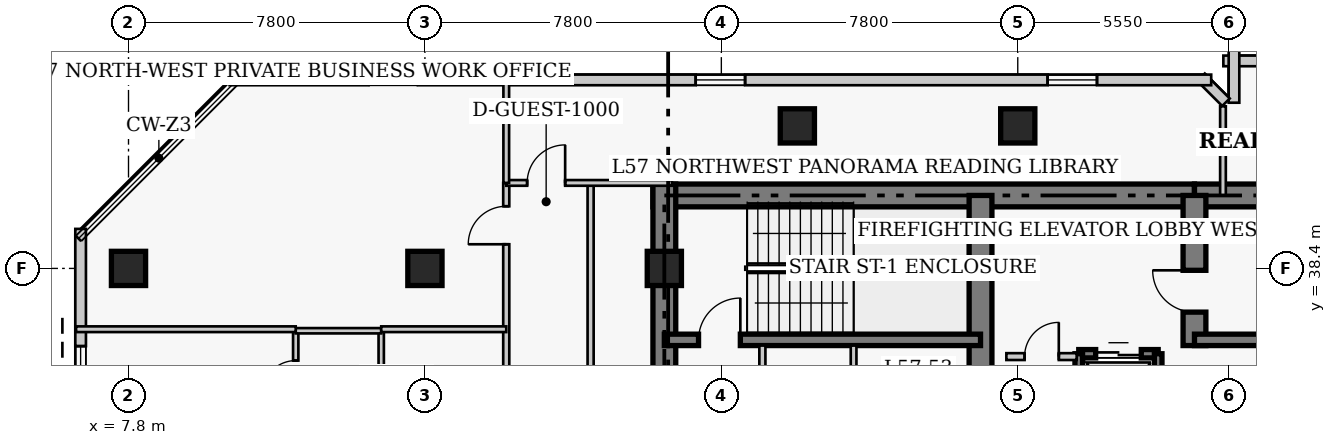
"""IFC4 building model, lengths in metres.
Left out: names, types, materials, properties, quantities, classifications, styles, units other than length and angle.
Written with IfcOpenShell. Run it as: python <this file> out.ifc"""

import sys

from ifc_helpers import new_model, si_unit, direction, frame, frame_2d, origin, origin_2d, place, context, subcontext, project, spatial, rectangle, extrude, element, fill, save


model = new_model("IFC4")
c1 = context("Model", 3, precision=1e-05, world=origin(), true_north=direction((0.0, 1.0)))
c2 = subcontext(c1, "Body", "Model", "MODEL_VIEW")
j1 = project(units=[si_unit("LENGTHUNIT", "METRE"), si_unit("PLANEANGLEUNIT", "RADIAN")], contexts=[c1])
p1 = place(None, origin())
s1 = spatial("IfcSite", under=j1, at=p1, CompositionType="ELEMENT")
p2 = place(p1, origin())
s2 = spatial("IfcBuilding", under=s1, at=p2, CompositionType="ELEMENT")
p3 = place(p2, frame((0.0, 0.0, 228.0)))
s3 = spatial("IfcBuildingStorey", under=s2, at=p3, CompositionType="ELEMENT", Elevation=228.0)
p4 = place(p3, frame((21.6, 40.32, 0.0), z_axis=(0.0, 0.0, 1.0), x_axis=(1.0, 0.0, 0.0)))
e1 = element("IfcWall", 1, at=p4, inside=s3, PredefinedType="SHEAR", context=c2, shape_type="SweptSolid", body=[
    extrude(rectangle(XDim=14.25, YDim=0.6, at=frame_2d((7.125, 0.0))), origin(), (0.0, 0.0, 1.0), 3.9),
])
p5 = place(p3, frame((35.85, 40.32, 0.0), z_axis=(0.0, 0.0, 1.0), x_axis=(1.0, 0.0, 0.0)))
e2 = element("IfcWall", 2, at=p5, inside=s3, PredefinedType="SHEAR", context=c2, shape_type="SweptSolid", body=[
    extrude(rectangle(XDim=12.6, YDim=0.6, at=frame_2d((6.3, 0.0))), origin(), (0.0, 0.0, 1.0), 3.9),
])
p6 = place(p3, frame((21.9, 27.05, 0.0), z_axis=(0.0, 0.0, 1.0), x_axis=(0.0, 1.0, 0.0)))
e3 = element("IfcWall", 3, at=p6, inside=s3, PredefinedType="SHEAR", context=c2, shape_type="SweptSolid", body=[
    extrude(rectangle(XDim=13.57, YDim=0.6, at=frame_2d((6.785, 0.0))), origin(), (0.0, 0.0, 1.0), 3.9),
])
p7 = place(p3, frame((30.22, 33.05, 0.0), z_axis=(0.0, 0.0, 1.0), x_axis=(0.0, 1.0, 0.0)))
e4 = element("IfcWall", 4, at=p7, inside=s3, PredefinedType="SHEAR", context=c2, shape_type="SweptSolid", body=[
    extrude(rectangle(XDim=7.27, YDim=0.6, at=frame_2d((3.635, 0.0))), origin(), (0.0, 0.0, 1.0), 3.9),
])
p8 = place(p3, frame((35.85, 36.37, 0.0), z_axis=(0.0, 0.0, 1.0), x_axis=(0.0, 1.0, 0.0)))
e5 = element("IfcWall", 5, at=p8, inside=s3, PredefinedType="SHEAR", context=c2, shape_type="SweptSolid", body=[
    extrude(rectangle(XDim=3.95, YDim=0.6, at=frame_2d((1.975, 0.0))), origin(), (0.0, 0.0, 1.0), 3.9),
])
p9 = place(p8, frame((0.88, 0.0, 0.0)))
e6 = element("IfcOpeningElement", 6, at=p9, cuts=e5, PredefinedType="OPENING", context=c2, shape_type="SweptSolid", body=[
    extrude(rectangle(XDim=1.1, YDim=2.15, at=frame_2d((0.55, 1.075))), frame((0.0, 0.31, 0.0), z_axis=(0.0, -1.0, 0.0), x_axis=(1.0, 0.0, 0.0)), (0.0, 0.0, 1.0), 0.62),
])
p10 = place(p3, frame((21.9, 36.52, 0.0), z_axis=(0.0, 0.0, 1.0), x_axis=(1.0, 0.0, 0.0)))
e7 = element("IfcWall", 7, at=p10, inside=s3, PredefinedType="SHEAR", context=c2, shape_type="SweptSolid", body=[
    extrude(rectangle(XDim=8.32, YDim=0.3, at=frame_2d((4.16, 0.0))), origin(), (0.0, 0.0, 1.0), 3.9),
])
p11 = place(p10, frame((0.9, 0.0, 0.0)))
e8 = element("IfcOpeningElement", 8, at=p11, cuts=e7, PredefinedType="OPENING", context=c2, shape_type="SweptSolid", body=[
    extrude(rectangle(XDim=1.1, YDim=2.15, at=frame_2d((0.55, 1.075))), frame((0.0, 0.16, 0.0), z_axis=(0.0, -1.0, 0.0), x_axis=(1.0, 0.0, 0.0)), (0.0, 0.0, 1.0), 0.32),
])
p12 = place(p3, frame((35.85, 36.52, 0.0), z_axis=(0.0, 0.0, 1.0), x_axis=(1.0, 0.0, 0.0)))
e9 = element("IfcWall", 9, at=p12, inside=s3, PredefinedType="SHEAR", context=c2, shape_type="SweptSolid", body=[
    extrude(rectangle(XDim=8.33, YDim=0.3, at=frame_2d((4.165, 0.0))), origin(), (0.0, 0.0, 1.0), 3.9),
])
for number, where, z_axis, x_axis in (
    (10, (7.8, 38.4, 0.0), (0.0, 0.0, 1.0), (1.0, 0.0, 0.0)),
    (11, (15.6, 38.4, 0.0), (0.0, 0.0, 1.0), (1.0, 0.0, 0.0)),
    (12, (21.9, 38.4, 0.0), (0.0, 0.0, 1.0), (1.0, 0.0, 0.0)),
    (13, (25.4, 42.15, 0.0), (0.0, 0.0, 1.0), (1.0, 0.0, 0.0)),
    (14, (31.2, 42.15, 0.0), (0.0, 0.0, 1.0), (1.0, 0.0, 0.0)),
):
    element("IfcColumn", number, at=place(p3, frame(where, z_axis=z_axis, x_axis=x_axis)), inside=s3, PredefinedType="COLUMN", context=c2, shape_type="SweptSolid", body=[
        extrude(rectangle(XDim=0.9, YDim=0.9, at=origin_2d()), origin(), (0.0, 0.0, 1.0), 3.9),
    ])
p13 = place(p3, frame((41.39, 43.86, 0.0), z_axis=(0.0, 0.0, 1.0), x_axis=(-1.0, 0.0, 0.0)))
e15 = element("IfcWall", 15, at=p13, inside=s3, PredefinedType="SOLIDWALL", context=c2, shape_type="SweptSolid", body=[
    extrude(rectangle(XDim=4.78, YDim=0.28, at=frame_2d((2.39, 0.0))), origin(), (0.0, 0.0, 1.0), 3.56),
])
p14 = place(p13, frame((1.74, 0.0, 0.85)))
e16 = element("IfcOpeningElement", 16, at=p14, cuts=e15, PredefinedType="OPENING", context=c2, shape_type="SweptSolid", body=[
    extrude(rectangle(XDim=1.3, YDim=1.7, at=frame_2d((0.65, 0.85))), frame((0.0, 0.15, 0.0), z_axis=(0.0, -1.0, 0.0), x_axis=(1.0, 0.0, 0.0)), (0.0, 0.0, 1.0), 0.3),
])
p15 = place(p3, frame((36.89, 44.14, 0.0), z_axis=(0.0, 0.0, 1.0), x_axis=(0.0, -1.0, 0.0)))
e17 = element("IfcWall", 17, at=p15, inside=s3, PredefinedType="SOLIDWALL", context=c2, shape_type="SweptSolid", body=[
    extrude(rectangle(XDim=1.38, YDim=0.28, at=frame_2d((0.69, 0.0))), origin(), (0.0, 0.0, 1.0), 3.56),
])
p16 = place(p3, frame((36.679, 42.773, 0.0), z_axis=(0.0, 0.0, 1.0), x_axis=(-0.707106781187, 0.707106781187, 0.0)))
e18 = element("IfcWall", 18, at=p16, inside=s3, PredefinedType="SOLIDWALL", context=c2, shape_type="SweptSolid", body=[
    extrude(rectangle(XDim=0.928, YDim=0.28, at=frame_2d((0.464, 0.0))), origin(), (0.0, 0.0, 1.0), 3.56),
])
p17 = place(p3, frame((36.29, 43.36, 0.0), z_axis=(0.0, 0.0, 1.0), x_axis=(-1.0, 0.0, 0.0)))
e19 = element("IfcWall", 19, at=p17, inside=s3, PredefinedType="SOLIDWALL", context=c2, shape_type="SweptSolid", body=[
    extrude(rectangle(XDim=25.83, YDim=0.28, at=frame_2d((12.915, 0.0))), origin(), (0.0, 0.0, 1.0), 3.56),
])
p18 = place(p17, frame((3.005, 0.0, 0.85)))
e20 = element("IfcOpeningElement", 20, at=p18, cuts=e19, PredefinedType="OPENING", context=c2, shape_type="SweptSolid", body=[
    extrude(rectangle(XDim=1.3, YDim=1.7, at=frame_2d((0.65, 0.85))), frame((0.0, 0.15, 0.0), z_axis=(0.0, -1.0, 0.0), x_axis=(1.0, 0.0, 0.0)), (0.0, 0.0, 1.0), 0.3),
])
p19 = place(p17, frame((12.265, 0.0, 0.85)))
e21 = element("IfcOpeningElement", 21, at=p19, cuts=e19, PredefinedType="OPENING", context=c2, shape_type="SweptSolid", body=[
    extrude(rectangle(XDim=1.3, YDim=1.7, at=frame_2d((0.65, 0.85))), frame((0.0, 0.15, 0.0), z_axis=(0.0, -1.0, 0.0), x_axis=(1.0, 0.0, 0.0)), (0.0, 0.0, 1.0), 0.3),
])
p20 = place(p17, frame((20.875, 0.0, 0.85)))
e22 = element("IfcOpeningElement", 22, at=p20, cuts=e19, PredefinedType="OPENING", context=c2, shape_type="SweptSolid", body=[
    extrude(rectangle(XDim=1.3, YDim=1.7, at=frame_2d((0.65, 0.85))), frame((0.0, 0.15, 0.0), z_axis=(0.0, -1.0, 0.0), x_axis=(1.0, 0.0, 0.0)), (0.0, 0.0, 1.0), 0.3),
])
p21 = place(p3, frame((6.54, 39.44, 0.0), z_axis=(0.0, 0.0, 1.0), x_axis=(0.0, -1.0, 0.0)))
e23 = element("IfcWall", 23, at=p21, inside=s3, PredefinedType="SOLIDWALL", context=c2, shape_type="SweptSolid", body=[
    extrude(rectangle(XDim=29.88, YDim=0.28, at=frame_2d((14.94, 0.0))), origin(), (0.0, 0.0, 1.0), 3.56),
])
p22 = place(p21, frame((3.085, 0.0, 0.85)))
e24 = element("IfcOpeningElement", 24, at=p22, cuts=e23, PredefinedType="OPENING", context=c2, shape_type="SweptSolid", body=[
    extrude(rectangle(XDim=1.3, YDim=1.7, at=frame_2d((0.65, 0.85))), frame((0.0, 0.15, 0.0), z_axis=(0.0, -1.0, 0.0), x_axis=(1.0, 0.0, 0.0)), (0.0, 0.0, 1.0), 0.3),
])
p23 = place(p21, frame((11.205, 0.0, 0.85)))
e25 = element("IfcOpeningElement", 25, at=p23, cuts=e23, PredefinedType="OPENING", context=c2, shape_type="SweptSolid", body=[
    extrude(rectangle(XDim=1.3, YDim=1.7, at=frame_2d((0.65, 0.85))), frame((0.0, 0.15, 0.0), z_axis=(0.0, -1.0, 0.0), x_axis=(1.0, 0.0, 0.0)), (0.0, 0.0, 1.0), 0.3),
])
p24 = place(p21, frame((17.375, 0.0, 0.85)))
e26 = element("IfcOpeningElement", 26, at=p24, cuts=e23, PredefinedType="OPENING", context=c2, shape_type="SweptSolid", body=[
    extrude(rectangle(XDim=1.3, YDim=1.7, at=frame_2d((0.65, 0.85))), frame((0.0, 0.15, 0.0), z_axis=(0.0, -1.0, 0.0), x_axis=(1.0, 0.0, 0.0)), (0.0, 0.0, 1.0), 0.3),
])
p25 = place(p21, frame((25.495, 0.0, 0.85)))
e27 = element("IfcOpeningElement", 27, at=p25, cuts=e23, PredefinedType="OPENING", context=c2, shape_type="SweptSolid", body=[
    extrude(rectangle(XDim=1.3, YDim=1.7, at=frame_2d((0.65, 0.85))), frame((0.0, 0.15, 0.0), z_axis=(0.0, -1.0, 0.0), x_axis=(1.0, 0.0, 0.0)), (0.0, 0.0, 1.0), 0.3),
])
p26 = place(p3, frame((32.805, 36.155, 0.0), z_axis=(0.0, 0.0, 1.0), x_axis=(1.0, 0.0, 0.0)))
e28 = element("IfcWall", 28, at=p26, inside=s3, PredefinedType="SHEAR", context=c2, shape_type="SweptSolid", body=[
    extrude(rectangle(XDim=2.09, YDim=0.22, at=frame_2d((1.045, 0.0))), origin(), (0.0, 0.0, 1.0), 3.9),
])
p27 = place(p26, frame((0.445, 0.0, 0.0)))
e29 = element("IfcOpeningElement", 29, at=p27, cuts=e28, PredefinedType="OPENING", context=c2, shape_type="SweptSolid", body=[
    extrude(rectangle(XDim=1.2, YDim=2.15, at=frame_2d((0.6, 1.075))), frame((0.0, 0.12, 0.0), z_axis=(0.0, -1.0, 0.0), x_axis=(1.0, 0.0, 0.0)), (0.0, 0.0, 1.0), 0.24),
])
for number, where, z_axis, x_axis in (
    (30, (32.805, 33.245, 0.0), (0.0, 0.0, 1.0), (0.0, 1.0, 0.0)),
    (31, (34.895, 33.245, 0.0), (0.0, 0.0, 1.0), (0.0, 1.0, 0.0)),
):
    element("IfcWall", number, at=place(p3, frame(where, z_axis=z_axis, x_axis=x_axis)), inside=s3, PredefinedType="SHEAR", context=c2, shape_type="SweptSolid", body=[
        extrude(rectangle(XDim=2.91, YDim=0.2, at=frame_2d((1.455, 0.0))), origin(), (0.0, 0.0, 1.0), 3.9),
    ])
p28 = place(p3, frame((30.9, 36.08, 0.0), z_axis=(0.0, 0.0, 1.0), x_axis=(1.0, 0.0, 0.0)))
e32 = element("IfcWall", 32, at=p28, inside=s3, PredefinedType="PARTITIONING", context=c2, shape_type="SweptSolid", body=[
    extrude(rectangle(XDim=1.85, YDim=0.18, at=frame_2d((0.925, 0.0))), origin(), (0.0, 0.0, 1.0), 3.56),
])
p29 = place(p28, frame((0.48, 0.0, 0.0)))
e33 = element("IfcOpeningElement", 33, at=p29, cuts=e32, PredefinedType="OPENING", context=c2, shape_type="SweptSolid", body=[
    extrude(rectangle(XDim=0.9, YDim=2.15, at=frame_2d((0.45, 1.075))), frame((0.0, 0.1, 0.0), z_axis=(0.0, -1.0, 0.0), x_axis=(1.0, 0.0, 0.0)), (0.0, 0.0, 1.0), 0.2),
])
p30 = place(p3, frame((24.48, 32.8, 0.0), z_axis=(0.0, 0.0, 1.0), x_axis=(0.0, 1.0, 0.0)))
e34 = element("IfcWall", 34, at=p30, inside=s3, PredefinedType="PARTITIONING", context=c2, shape_type="SweptSolid", body=[
    extrude(rectangle(XDim=3.57, YDim=0.16, at=frame_2d((1.785, 0.0))), origin(), (0.0, 0.0, 1.0), 3.56),
])
p31 = place(p30, frame((1.604, 0.0, 0.0)))
e35 = element("IfcOpeningElement", 35, at=p31, cuts=e34, PredefinedType="OPENING", context=c2, shape_type="SweptSolid", body=[
    extrude(rectangle(XDim=0.9, YDim=2.1, at=frame_2d((0.45, 1.05))), frame((0.0, 0.09, 0.0), z_axis=(0.0, -1.0, 0.0), x_axis=(1.0, 0.0, 0.0)), (0.0, 0.0, 1.0), 0.18),
])
p32 = place(p3, frame((26.88, 32.75, 0.0), z_axis=(0.0, 0.0, 1.0), x_axis=(0.0, 1.0, 0.0)))
e36 = element("IfcWall", 36, at=p32, inside=s3, PredefinedType="PARTITIONING", context=c2, shape_type="SweptSolid", body=[
    extrude(rectangle(XDim=3.62, YDim=0.15, at=frame_2d((1.81, 0.0))), origin(), (0.0, 0.0, 1.0), 3.56),
])
p33 = place(p3, frame((17.74, 7.55, 0.0), z_axis=(0.0, 0.0, 1.0), x_axis=(0.0, 1.0, 0.0)))
e37 = element("IfcWall", 37, at=p33, inside=s3, PredefinedType="PARTITIONING", context=c2, shape_type="SweptSolid", body=[
    extrude(rectangle(XDim=33.1, YDim=0.16, at=frame_2d((16.55, 0.0))), origin(), (0.0, 0.0, 1.0), 3.56),
])
p34 = place(p33, frame((1.35, 0.0, 0.0)))
e38 = element("IfcOpeningElement", 38, at=p34, cuts=e37, PredefinedType="OPENING", context=c2, shape_type="SweptSolid", body=[
    extrude(rectangle(XDim=0.95, YDim=2.1, at=frame_2d((0.475, 1.05))), frame((0.0, 0.09, 0.0), z_axis=(0.0, -1.0, 0.0), x_axis=(1.0, 0.0, 0.0)), (0.0, 0.0, 1.0), 0.18),
])
p35 = place(p33, frame((7.575, 0.0, 0.0)))
e39 = element("IfcOpeningElement", 39, at=p35, cuts=e37, PredefinedType="OPENING", context=c2, shape_type="SweptSolid", body=[
    extrude(rectangle(XDim=0.95, YDim=2.1, at=frame_2d((0.475, 1.05))), frame((0.0, 0.09, 0.0), z_axis=(0.0, -1.0, 0.0), x_axis=(1.0, 0.0, 0.0)), (0.0, 0.0, 1.0), 0.18),
])
p36 = place(p33, frame((16.375, 0.0, 0.0)))
e40 = element("IfcOpeningElement", 40, at=p36, cuts=e37, PredefinedType="OPENING", context=c2, shape_type="SweptSolid", body=[
    extrude(rectangle(XDim=0.95, YDim=2.1, at=frame_2d((0.475, 1.05))), frame((0.0, 0.09, 0.0), z_axis=(0.0, -1.0, 0.0), x_axis=(1.0, 0.0, 0.0)), (0.0, 0.0, 1.0), 0.18),
])
p37 = place(p33, frame((24.775, 0.0, 0.0)))
e41 = element("IfcOpeningElement", 41, at=p37, cuts=e37, PredefinedType="OPENING", context=c2, shape_type="SweptSolid", body=[
    extrude(rectangle(XDim=0.95, YDim=2.1, at=frame_2d((0.475, 1.05))), frame((0.0, 0.09, 0.0), z_axis=(0.0, -1.0, 0.0), x_axis=(1.0, 0.0, 0.0)), (0.0, 0.0, 1.0), 0.18),
])
p38 = place(p33, frame((31.486, 0.0, 0.0)))
e42 = element("IfcOpeningElement", 42, at=p38, cuts=e37, PredefinedType="OPENING", context=c2, shape_type="SweptSolid", body=[
    extrude(rectangle(XDim=1.0, YDim=2.15, at=frame_2d((0.5, 1.075))), frame((0.0, 0.09, 0.0), z_axis=(0.0, -1.0, 0.0), x_axis=(1.0, 0.0, 0.0)), (0.0, 0.0, 1.0), 0.18),
])
p39 = place(p3, frame((19.96, 35.02, 0.0), z_axis=(0.0, 0.0, 1.0), x_axis=(0.0, 1.0, 0.0)))
e43 = element("IfcWall", 43, at=p39, inside=s3, PredefinedType="PARTITIONING", context=c2, shape_type="SweptSolid", body=[
    extrude(rectangle(XDim=5.63, YDim=0.16, at=frame_2d((2.815, 0.0))), origin(), (0.0, 0.0, 1.0), 3.56),
])
p40 = place(p3, frame((17.74, 40.65, 0.0), z_axis=(0.0, 0.0, 1.0), x_axis=(1.0, 0.0, 0.0)))
e44 = element("IfcWall", 44, at=p40, inside=s3, PredefinedType="PARTITIONING", context=c2, shape_type="SweptSolid", body=[
    extrude(rectangle(XDim=4.36, YDim=0.15, at=frame_2d((2.18, 0.0))), origin(), (0.0, 0.0, 1.0), 3.56),
])
p41 = place(p40, frame((0.55, 0.0, 0.0)))
e45 = element("IfcOpeningElement", 45, at=p41, cuts=e44, PredefinedType="OPENING", context=c2, shape_type="SweptSolid", body=[
    extrude(rectangle(XDim=1.0, YDim=2.15, at=frame_2d((0.5, 1.075))), frame((0.0, 0.085, 0.0), z_axis=(0.0, -1.0, 0.0), x_axis=(1.0, 0.0, 0.0)), (0.0, 0.0, 1.0), 0.17),
])
p42 = place(p3, frame((17.74, 40.65, 0.0), z_axis=(0.0, 0.0, 1.0), x_axis=(0.0, 1.0, 0.0)))
e46 = element("IfcWall", 46, at=p42, inside=s3, PredefinedType="PARTITIONING", context=c2, shape_type="SweptSolid", body=[
    extrude(rectangle(XDim=2.83, YDim=0.15, at=frame_2d((1.415, 0.0))), origin(), (0.0, 0.0, 1.0), 3.56),
])
p43 = place(p3, frame((36.6, 40.32, 0.0), z_axis=(0.0, 0.0, 1.0), x_axis=(0.0, 1.0, 0.0)))
e47 = element("IfcWall", 47, at=p43, inside=s3, PredefinedType="PARTITIONING", context=c2, shape_type="SweptSolid", body=[
    extrude(rectangle(XDim=2.345, YDim=0.15, at=frame_2d((1.172, 0.0))), origin(), (0.0, 0.0, 1.0), 3.56),
])
p44 = place(p3, frame((12.2, 34.31, 0.0), z_axis=(0.0, 0.0, 1.0), x_axis=(0.0, 1.0, 0.0)))
e48 = element("IfcWall", 48, at=p44, inside=s3, PredefinedType="PLUMBINGWALL", context=c2, shape_type="SweptSolid", body=[
    extrude(rectangle(XDim=2.45, YDim=0.14, at=frame_2d((1.225, 0.0))), origin(), (0.0, 0.0, 1.0), 3.56),
])
p45 = place(p44, frame((0.785, 0.0, 0.0)))
e49 = element("IfcOpeningElement", 49, at=p45, cuts=e48, PredefinedType="OPENING", context=c2, shape_type="SweptSolid", body=[
    extrude(rectangle(XDim=0.88, YDim=2.05, at=frame_2d((0.44, 1.025))), frame((0.0, 0.08, 0.0), z_axis=(0.0, -1.0, 0.0), x_axis=(1.0, 0.0, 0.0)), (0.0, 0.0, 1.0), 0.16),
])
p46 = place(p3, frame((14.45, 34.31, 0.0), z_axis=(0.0, 0.0, 1.0), x_axis=(0.0, 1.0, 0.0)))
e50 = element("IfcWall", 50, at=p46, inside=s3, PredefinedType="PLUMBINGWALL", context=c2, shape_type="SweptSolid", body=[
    extrude(rectangle(XDim=2.45, YDim=0.14, at=frame_2d((1.225, 0.0))), origin(), (0.0, 0.0, 1.0), 3.56),
])
p47 = place(p3, frame((12.2, 36.76, 0.0), z_axis=(0.0, 0.0, 1.0), x_axis=(1.0, 0.0, 0.0)))
e51 = element("IfcWall", 51, at=p47, inside=s3, PredefinedType="PLUMBINGWALL", context=c2, shape_type="SweptSolid", body=[
    extrude(rectangle(XDim=2.25, YDim=0.14, at=frame_2d((1.125, 0.0))), origin(), (0.0, 0.0, 1.0), 3.56),
])
p48 = place(p3, frame((6.42, 36.8, 0.0), z_axis=(0.0, 0.0, 1.0), x_axis=(1.0, 0.0, 0.0)))
e52 = element("IfcWall", 52, at=p48, inside=s3, PredefinedType="PARTITIONING", context=c2, shape_type="SweptSolid", body=[
    extrude(rectangle(XDim=5.78, YDim=0.15, at=frame_2d((2.89, 0.0))), origin(), (0.0, 0.0, 1.0), 3.56),
])
p49 = place(p3, frame((14.45, 36.8, 0.0), z_axis=(0.0, 0.0, 1.0), x_axis=(1.0, 0.0, 0.0)))
e53 = element("IfcWall", 53, at=p49, inside=s3, PredefinedType="PARTITIONING", context=c2, shape_type="SweptSolid", body=[
    extrude(rectangle(XDim=3.29, YDim=0.15, at=frame_2d((1.645, 0.0))), origin(), (0.0, 0.0, 1.0), 3.56),
])
p50 = place(p18, origin())
e54 = element("IfcWindow", 54, at=p50, inside=s3, PartitioningType="SINGLE_PANEL", PredefinedType="WINDOW", context=c2, shape_type="SweptSolid", body=[
    extrude(rectangle(XDim=1.3, YDim=1.7, at=frame_2d((0.65, 0.85))), frame((0.0, 0.03, 0.0), z_axis=(0.0, -1.0, 0.0), x_axis=(1.0, 0.0, 0.0)), (0.0, 0.0, 1.0), 0.06),
])
fill(e20, e54)
p51 = place(p19, origin())
e55 = element("IfcWindow", 55, at=p51, inside=s3, PartitioningType="SINGLE_PANEL", PredefinedType="WINDOW", context=c2, shape_type="SweptSolid", body=[
    extrude(rectangle(XDim=1.3, YDim=1.7, at=frame_2d((0.65, 0.85))), frame((0.0, 0.03, 0.0), z_axis=(0.0, -1.0, 0.0), x_axis=(1.0, 0.0, 0.0)), (0.0, 0.0, 1.0), 0.06),
])
fill(e21, e55)
p52 = place(p20, origin())
e56 = element("IfcWindow", 56, at=p52, inside=s3, PartitioningType="SINGLE_PANEL", PredefinedType="WINDOW", context=c2, shape_type="SweptSolid", body=[
    extrude(rectangle(XDim=1.3, YDim=1.7, at=frame_2d((0.65, 0.85))), frame((0.0, 0.03, 0.0), z_axis=(0.0, -1.0, 0.0), x_axis=(1.0, 0.0, 0.0)), (0.0, 0.0, 1.0), 0.06),
])
fill(e22, e56)
p53 = place(p22, origin())
e57 = element("IfcWindow", 57, at=p53, inside=s3, PartitioningType="SINGLE_PANEL", PredefinedType="WINDOW", context=c2, shape_type="SweptSolid", body=[
    extrude(rectangle(XDim=1.3, YDim=1.7, at=frame_2d((0.65, 0.85))), frame((0.0, 0.03, 0.0), z_axis=(0.0, -1.0, 0.0), x_axis=(1.0, 0.0, 0.0)), (0.0, 0.0, 1.0), 0.06),
])
fill(e24, e57)
p54 = place(p27, origin())
e58 = element("IfcDoor", 58, at=p54, inside=s3, OperationType="DOUBLE_DOOR_SLIDING", PredefinedType="DOOR", context=c2, shape_type="SweptSolid", body=[
    extrude(rectangle(XDim=1.2, YDim=2.15, at=frame_2d((0.6, 1.075))), frame((0.0, 0.025, 0.0), z_axis=(0.0, -1.0, 0.0), x_axis=(1.0, 0.0, 0.0)), (0.0, 0.0, 1.0), 0.05),
])
fill(e29, e58)
p55 = place(p29, origin())
e59 = element("IfcDoor", 59, at=p55, inside=s3, OperationType="SINGLE_SWING_RIGHT", PredefinedType="DOOR", context=c2, shape_type="SweptSolid", body=[
    extrude(rectangle(XDim=0.9, YDim=2.15, at=frame_2d((0.45, 1.075))), frame((0.0, 0.025, 0.0), z_axis=(0.0, -1.0, 0.0), x_axis=(1.0, 0.0, 0.0)), (0.0, 0.0, 1.0), 0.05),
])
fill(e33, e59)
p56 = place(p41, origin())
e60 = element("IfcDoor", 60, at=p56, inside=s3, OperationType="SINGLE_SWING_RIGHT", PredefinedType="DOOR", context=c2, shape_type="SweptSolid", body=[
    extrude(rectangle(XDim=1.0, YDim=2.15, at=frame_2d((0.5, 1.075))), frame((0.0, 0.025, 0.0), z_axis=(0.0, -1.0, 0.0), x_axis=(1.0, 0.0, 0.0)), (0.0, 0.0, 1.0), 0.05),
])
fill(e45, e60)
p57 = place(p45, origin())
e61 = element("IfcDoor", 61, at=p57, inside=s3, OperationType="SINGLE_SWING_LEFT", PredefinedType="DOOR", context=c2, shape_type="SweptSolid", body=[
    extrude(rectangle(XDim=0.88, YDim=2.05, at=frame_2d((0.44, 1.025))), frame((0.0, 0.025, 0.0), z_axis=(0.0, -1.0, 0.0), x_axis=(1.0, 0.0, 0.0)), (0.0, 0.0, 1.0), 0.05),
])
fill(e49, e61)
p58 = place(p38, origin())
e62 = element("IfcDoor", 62, at=p58, inside=s3, OperationType="SINGLE_SWING_LEFT", PredefinedType="DOOR", context=c2, shape_type="SweptSolid", body=[
    extrude(rectangle(XDim=1.0, YDim=2.15, at=frame_2d((0.5, 1.075))), frame((0.0, 0.025, 0.0), z_axis=(0.0, -1.0, 0.0), x_axis=(1.0, 0.0, 0.0)), (0.0, 0.0, 1.0), 0.05),
])
fill(e42, e62)
p59 = place(p11, origin())
e63 = element("IfcDoor", 63, at=p59, inside=s3, OperationType="SINGLE_SWING_RIGHT", PredefinedType="DOOR", context=c2, shape_type="SweptSolid", body=[
    extrude(rectangle(XDim=1.1, YDim=2.15, at=frame_2d((0.55, 1.075))), frame((0.0, 0.025, 0.0), z_axis=(0.0, -1.0, 0.0), x_axis=(1.0, 0.0, 0.0)), (0.0, 0.0, 1.0), 0.05),
])
fill(e8, e63)
p60 = place(p9, origin())
e64 = element("IfcDoor", 64, at=p60, inside=s3, OperationType="SINGLE_SWING_RIGHT", PredefinedType="DOOR", context=c2, shape_type="SweptSolid", body=[
    extrude(rectangle(XDim=1.1, YDim=2.15, at=frame_2d((0.55, 1.075))), frame((0.0, 0.025, 0.0), z_axis=(0.0, -1.0, 0.0), x_axis=(1.0, 0.0, 0.0)), (0.0, 0.0, 1.0), 0.05),
])
fill(e6, e64)
save(model, sys.argv[1])
